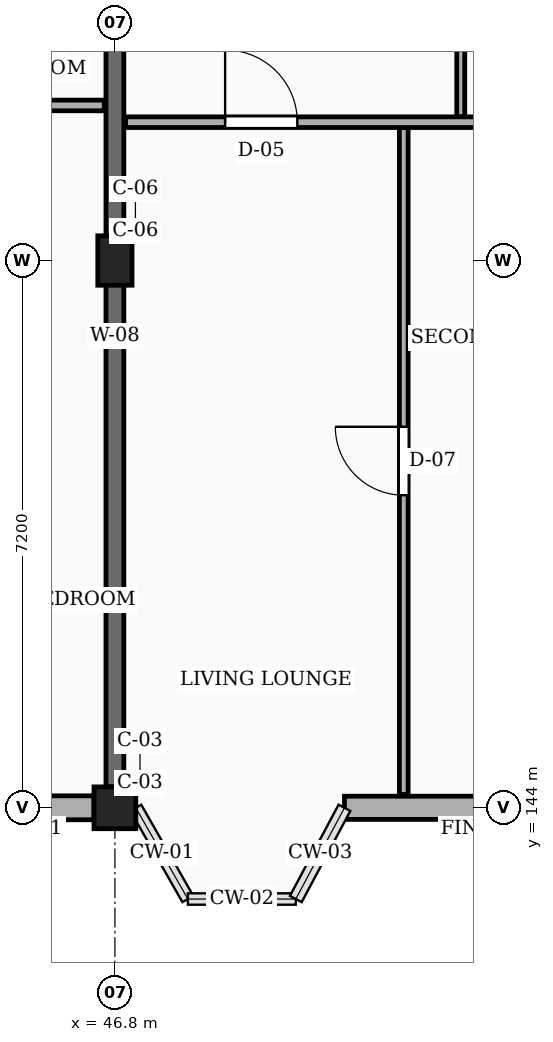
"""IFC4 building model, lengths in metres.
Left out: names, types, materials, properties, quantities, classifications, styles, units other than length and angle.
Written with IfcOpenShell. Run it as: python <this file> out.ifc"""

import sys

from ifc_helpers import new_model, si_unit, direction, frame, frame_2d, origin, origin_2d, place, context, subcontext, project, spatial, rectangle, extrude, element, fill, save


model = new_model("IFC4")
c1 = context("Model", 3, precision=1e-05, world=origin(), true_north=direction((0.0, 1.0)))
c2 = subcontext(c1, "Body", "Model", "MODEL_VIEW")
j1 = project(units=[si_unit("LENGTHUNIT", "METRE"), si_unit("PLANEANGLEUNIT", "RADIAN")], contexts=[c1])
p1 = place(None, origin())
s1 = spatial("IfcSite", under=j1, at=p1, CompositionType="ELEMENT")
p2 = place(p1, origin())
s2 = spatial("IfcBuilding", under=s1, at=p2, CompositionType="ELEMENT")
p3 = place(p2, frame((0.0, 0.0, 13.95)))
s3 = spatial("IfcBuildingStorey", under=s2, at=p3, CompositionType="ELEMENT", Elevation=13.95)
p4 = place(p3, frame((46.8, 144.0, 0.0), z_axis=(0.0, 0.0, 1.0), x_axis=(1.0, 0.0, 0.0)))
e1 = element("IfcColumn", 1, at=p4, inside=s3, PredefinedType="COLUMN", context=c2, shape_type="SweptSolid", body=[
    extrude(rectangle(XDim=0.55, YDim=0.55, at=origin_2d()), origin(), (0.0, 0.0, 1.0), 3.15),
])
p5 = place(p3, frame((46.8, 151.2, 0.0), z_axis=(0.0, 0.0, 1.0), x_axis=(1.0, 0.0, 0.0)))
e2 = element("IfcColumn", 2, at=p5, inside=s3, PredefinedType="COLUMN", context=c2, shape_type="SweptSolid", body=[
    extrude(rectangle(XDim=0.45, YDim=0.65, at=origin_2d()), origin(), (0.0, 0.0, 1.0), 3.15),
])
p6 = place(p3, frame((46.8, 144.275, 0.0), z_axis=(0.0, 0.0, 1.0), x_axis=(0.0, 1.0, 0.0)))
e3 = element("IfcWall", 3, at=p6, inside=s3, PredefinedType="SOLIDWALL", context=c2, shape_type="SweptSolid", body=[
    extrude(rectangle(XDim=11.875, YDim=0.235, at=frame_2d((5.938, 0.0))), origin(), (0.0, 0.0, 1.0), 2.185),
])
p7 = place(p3, frame((39.875, 144.0, 0.0), z_axis=(0.0, 0.0, 1.0), x_axis=(1.0, 0.0, 0.0)))
e4 = element("IfcWall", 4, at=p7, inside=s3, PredefinedType="SOLIDWALL", context=c2, shape_type="SweptSolid", body=[
    extrude(rectangle(XDim=6.65, YDim=0.315, at=frame_2d((3.325, 0.0))), origin(), (0.0, 0.0, 1.0), 2.455),
])
p8 = place(p7, frame((0.45, 0.0, 0.78)))
e5 = element("IfcOpeningElement", 5, at=p8, cuts=e4, PredefinedType="OPENING", context=c2, shape_type="SweptSolid", body=[
    extrude(rectangle(XDim=0.98, YDim=1.36, at=frame_2d((0.49, 0.68))), frame((0.0, 0.167, 0.0), z_axis=(0.0, -1.0, 0.0), x_axis=(1.0, 0.0, 0.0)), (0.0, 0.0, 1.0), 0.335),
])
p9 = place(p7, frame((4.65, 0.0, 0.78)))
e6 = element("IfcOpeningElement", 6, at=p9, cuts=e4, PredefinedType="OPENING", context=c2, shape_type="SweptSolid", body=[
    extrude(rectangle(XDim=1.14, YDim=1.36, at=frame_2d((0.57, 0.68))), frame((0.0, 0.167, 0.0), z_axis=(0.0, -1.0, 0.0), x_axis=(1.0, 0.0, 0.0)), (0.0, 0.0, 1.0), 0.335),
])
p10 = place(p3, frame((49.82, 144.0, 0.0), z_axis=(0.0, 0.0, 1.0), x_axis=(1.0, 0.0, 0.0)))
e7 = element("IfcWall", 7, at=p10, inside=s3, PredefinedType="SOLIDWALL", context=c2, shape_type="SweptSolid", body=[
    extrude(rectangle(XDim=3.905, YDim=0.305, at=frame_2d((1.953, 0.0))), origin(), (0.0, 0.0, 1.0), 2.455),
])
p11 = place(p10, frame((1.718, 0.0, 0.78)))
e8 = element("IfcOpeningElement", 8, at=p11, cuts=e7, PredefinedType="OPENING", context=c2, shape_type="SweptSolid", body=[
    extrude(rectangle(XDim=1.14, YDim=1.36, at=frame_2d((0.57, 0.68))), frame((0.0, 0.163, 0.0), z_axis=(0.0, -1.0, 0.0), x_axis=(1.0, 0.0, 0.0)), (0.0, 0.0, 1.0), 0.325),
])
p12 = place(p3, frame((39.74, 153.24, 0.0), z_axis=(0.0, 0.0, 1.0), x_axis=(1.0, 0.0, 0.0)))
e9 = element("IfcWall", 9, at=p12, inside=s3, PredefinedType="PARTITIONING", context=c2, shape_type="SweptSolid", body=[
    extrude(rectangle(XDim=6.92, YDim=0.14, at=frame_2d((3.46, 0.0))), origin(), (0.0, 0.0, 1.0), 2.32),
])
p13 = place(p12, frame((1.31, 0.0, 0.0)))
e10 = element("IfcOpeningElement", 10, at=p13, cuts=e9, PredefinedType="OPENING", context=c2, shape_type="SweptSolid", body=[
    extrude(rectangle(XDim=0.92, YDim=2.1, at=frame_2d((0.46, 1.05))), frame((0.0, 0.08, 0.0), z_axis=(0.0, -1.0, 0.0), x_axis=(1.0, 0.0, 0.0)), (0.0, 0.0, 1.0), 0.16),
])
p14 = place(p3, frame((50.6, 144.175, 0.0), z_axis=(0.0, 0.0, 1.0), x_axis=(0.0, 1.0, 0.0)))
e11 = element("IfcWall", 11, at=p14, inside=s3, PredefinedType="PARTITIONING", context=c2, shape_type="SweptSolid", body=[
    extrude(rectangle(XDim=8.775, YDim=0.115, at=frame_2d((4.387, 0.0))), origin(), (0.0, 0.0, 1.0), 2.32),
])
p15 = place(p14, frame((3.938, 0.0, 0.0)))
e12 = element("IfcOpeningElement", 12, at=p15, cuts=e11, PredefinedType="OPENING", context=c2, shape_type="SweptSolid", body=[
    extrude(rectangle(XDim=0.9, YDim=2.1, at=frame_2d((0.45, 1.05))), frame((0.0, 0.067, 0.0), z_axis=(0.0, -1.0, 0.0), x_axis=(1.0, 0.0, 0.0)), (0.0, 0.0, 1.0), 0.135),
])
p16 = place(p3, frame((51.35, 153.09, 0.0), z_axis=(0.0, 0.0, 1.0), x_axis=(0.0, 1.0, 0.0)))
e13 = element("IfcWall", 13, at=p16, inside=s3, PredefinedType="PARTITIONING", context=c2, shape_type="SweptSolid", body=[
    extrude(rectangle(XDim=3.12, YDim=0.105, at=frame_2d((1.56, 0.0))), origin(), (0.0, 0.0, 1.0), 2.32),
])
p17 = place(p16, frame((1.11, 0.0, 0.0)))
e14 = element("IfcOpeningElement", 14, at=p17, cuts=e13, PredefinedType="OPENING", context=c2, shape_type="SweptSolid", body=[
    extrude(rectangle(XDim=0.9, YDim=2.05, at=frame_2d((0.45, 1.025))), frame((0.0, 0.062, 0.0), z_axis=(0.0, -1.0, 0.0), x_axis=(1.0, 0.0, 0.0)), (0.0, 0.0, 1.0), 0.125),
])
p18 = place(p3, frame((46.94, 153.02, 0.0), z_axis=(0.0, 0.0, 1.0), x_axis=(1.0, 0.0, 0.0)))
e15 = element("IfcWall", 15, at=p18, inside=s3, PredefinedType="PARTITIONING", context=c2, shape_type="SweptSolid", body=[
    extrude(rectangle(XDim=6.92, YDim=0.14, at=frame_2d((3.46, 0.0))), origin(), (0.0, 0.0, 1.0), 2.32),
])
p19 = place(p18, frame((1.31, 0.0, 0.0)))
e16 = element("IfcOpeningElement", 16, at=p19, cuts=e15, PredefinedType="OPENING", context=c2, shape_type="SweptSolid", body=[
    extrude(rectangle(XDim=0.95, YDim=2.1, at=frame_2d((0.475, 1.05))), frame((0.0, 0.08, 0.0), z_axis=(0.0, -1.0, 0.0), x_axis=(1.0, 0.0, 0.0)), (0.0, 0.0, 1.0), 0.16),
])
p20 = place(p15, origin())
e17 = element("IfcDoor", 17, at=p20, inside=s3, OperationType="SINGLE_SWING_RIGHT", PredefinedType="DOOR", context=c2, shape_type="SweptSolid", body=[
    extrude(rectangle(XDim=0.9, YDim=2.1, at=frame_2d((0.45, 1.05))), frame((0.0, 0.025, 0.0), z_axis=(0.0, -1.0, 0.0), x_axis=(1.0, 0.0, 0.0)), (0.0, 0.0, 1.0), 0.05),
])
fill(e12, e17)
p21 = place(p19, origin())
e18 = element("IfcDoor", 18, at=p21, inside=s3, OperationType="SINGLE_SWING_LEFT", PredefinedType="DOOR", context=c2, shape_type="SweptSolid", body=[
    extrude(rectangle(XDim=0.95, YDim=2.1, at=frame_2d((0.475, 1.05))), frame((0.0, 0.025, 0.0), z_axis=(0.0, -1.0, 0.0), x_axis=(1.0, 0.0, 0.0)), (0.0, 0.0, 1.0), 0.05),
])
fill(e16, e18)
save(model, sys.argv[1])
